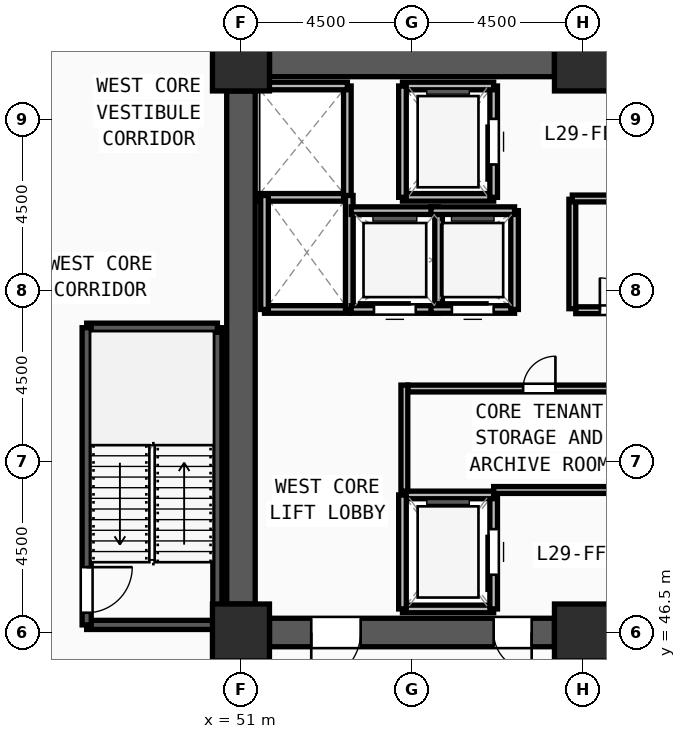
"""IFC4 building model, lengths in metres.
Left out: names, types, materials, properties, quantities, classifications, styles, units other than length and angle.
Written with IfcOpenShell. Run it as: python <this file> out.ifc"""

import sys

from ifc_helpers import new_model, si_unit, direction, frame, frame_2d, origin, origin_2d, place, context, subcontext, project, spatial, rectangle, extrude, source, transform, mapped, element, fill, save


model = new_model("IFC4")
c1 = context("Model", 3, precision=1e-05, world=origin(), true_north=direction((0.0, 1.0)))
c2 = subcontext(c1, "Body", "Model", "MODEL_VIEW")
j1 = project(units=[si_unit("LENGTHUNIT", "METRE"), si_unit("PLANEANGLEUNIT", "RADIAN")], contexts=[c1])
p1 = place(None, origin())
s1 = spatial("IfcSite", under=j1, at=p1, CompositionType="ELEMENT")
p2 = place(p1, origin())
s2 = spatial("IfcBuilding", under=s1, at=p2, CompositionType="ELEMENT")
p3 = place(p2, frame((0.0, 0.0, 113.25)))
s3 = spatial("IfcBuildingStorey", under=s2, at=p3, CompositionType="ELEMENT", Elevation=113.25)
m1 = source(origin(), c2, "Body", "SweptSolid", [
    extrude(rectangle(XDim=1.5, YDim=1.5, at=origin_2d()), origin(), (0.0, 0.0, 1.0), 3.75),
])
for number, where, z_axis, x_axis in (
    (1, (51.0, 46.5, 0.0), (0.0, 0.0, 1.0), (1.0, 0.0, 0.0)),
    (2, (60.0, 46.5, 0.0), (0.0, 0.0, 1.0), (1.0, 0.0, 0.0)),
    (3, (60.0, 61.5, 0.0), (0.0, 0.0, 1.0), (1.0, 0.0, 0.0)),
    (4, (51.0, 61.5, 0.0), (0.0, 0.0, 1.0), (1.0, 0.0, 0.0)),
):
    element("IfcColumn", number, at=place(p3, frame(where, z_axis=z_axis, x_axis=x_axis)), inside=s3, PredefinedType="COLUMN", context=c2, shape_type="MappedRepresentation", body=[
        mapped(m1, transform((0.0, 0.0, 0.0), x_axis=(1.0, 0.0, 0.0), y_axis=(0.0, 1.0, 0.0), z_axis=(0.0, 0.0, 1.0), scale=1.0)),
    ])
p4 = place(p3, frame((51.75, 61.5, 0.0), z_axis=(0.0, 0.0, 1.0), x_axis=(1.0, 0.0, 0.0)))
e5 = element("IfcWall", 5, at=p4, inside=s3, PredefinedType="SHEAR", context=c2, shape_type="SweptSolid", body=[
    extrude(rectangle(XDim=7.5, YDim=0.75, at=frame_2d((3.75, 0.0))), origin(), (0.0, 0.0, 1.0), 3.57),
])
p5 = place(p3, frame((59.25, 46.5, 0.0), z_axis=(0.0, 0.0, 1.0), x_axis=(-1.0, 0.0, 0.0)))
e6 = element("IfcWall", 6, at=p5, inside=s3, PredefinedType="SHEAR", context=c2, shape_type="SweptSolid", body=[
    extrude(rectangle(XDim=7.5, YDim=0.75, at=frame_2d((3.75, 0.0))), origin(), (0.0, 0.0, 1.0), 3.57),
])
m2 = source(origin(), c2, "Body", "SweptSolid", [
    extrude(rectangle(XDim=1.3, YDim=2.2, at=frame_2d((0.65, 1.1))), frame((0.0, 0.385, 0.0), z_axis=(0.0, -1.0, 0.0), x_axis=(1.0, 0.0, 0.0)), (0.0, 0.0, 1.0), 0.77),
])
p6 = place(p5, frame((5.1, 0.0, 0.0)))
e7 = element("IfcOpeningElement", 7, at=p6, cuts=e6, PredefinedType="OPENING", context=c2, shape_type="MappedRepresentation", body=[
    mapped(m2, transform((0.0, 0.0, 0.0), x_axis=(1.0, 0.0, 0.0), y_axis=(0.0, 1.0, 0.0), z_axis=(0.0, 0.0, 1.0), scale=1.0)),
])
m3 = source(origin(), c2, "Body", "SweptSolid", [
    extrude(rectangle(XDim=1.0, YDim=2.2, at=frame_2d((0.5, 1.1))), frame((0.0, 0.385, 0.0), z_axis=(0.0, -1.0, 0.0), x_axis=(1.0, 0.0, 0.0)), (0.0, 0.0, 1.0), 0.77),
])
p7 = place(p5, frame((0.6, 0.0, 0.0)))
e8 = element("IfcOpeningElement", 8, at=p7, cuts=e6, PredefinedType="OPENING", context=c2, shape_type="MappedRepresentation", body=[
    mapped(m3, transform((0.0, 0.0, 0.0), x_axis=(1.0, 0.0, 0.0), y_axis=(0.0, 1.0, 0.0), z_axis=(0.0, 0.0, 1.0), scale=1.0)),
])
p8 = place(p3, frame((51.0, 47.25, 0.0), z_axis=(0.0, 0.0, 1.0), x_axis=(0.0, 1.0, 0.0)))
e9 = element("IfcWall", 9, at=p8, inside=s3, PredefinedType="SHEAR", context=c2, shape_type="SweptSolid", body=[
    extrude(rectangle(XDim=13.5, YDim=0.75, at=frame_2d((6.75, 0.0))), origin(), (0.0, 0.0, 1.0), 3.57),
])
p9 = place(p3, frame((46.94, 46.7, 0.0), z_axis=(0.0, 0.0, 1.0), x_axis=(1.0, 0.0, 0.0)))
e10 = element("IfcWall", 10, at=p9, inside=s3, PredefinedType="SOLIDWALL", context=c2, shape_type="SweptSolid", body=[
    extrude(rectangle(XDim=3.44, YDim=0.24, at=frame_2d((1.72, 0.0))), origin(), (0.0, 0.0, 1.0), 3.57),
])
p10 = place(p3, frame((50.38, 46.7, 0.0), z_axis=(0.0, 0.0, 1.0), x_axis=(0.0, 1.0, 0.0)))
e11 = element("IfcWall", 11, at=p10, inside=s3, PredefinedType="SOLIDWALL", context=c2, shape_type="SweptSolid", body=[
    extrude(rectangle(XDim=7.82, YDim=0.24, at=frame_2d((3.91, 0.0))), origin(), (0.0, 0.0, 1.0), 3.57),
])
p11 = place(p3, frame((50.38, 54.52, 0.0), z_axis=(0.0, 0.0, 1.0), x_axis=(-1.0, 0.0, 0.0)))
e12 = element("IfcWall", 12, at=p11, inside=s3, PredefinedType="SOLIDWALL", context=c2, shape_type="SweptSolid", body=[
    extrude(rectangle(XDim=3.44, YDim=0.24, at=frame_2d((1.72, 0.0))), origin(), (0.0, 0.0, 1.0), 3.57),
])
p12 = place(p3, frame((46.94, 54.52, 0.0), z_axis=(0.0, 0.0, 1.0), x_axis=(0.0, -1.0, 0.0)))
e13 = element("IfcWall", 13, at=p12, inside=s3, PredefinedType="SOLIDWALL", context=c2, shape_type="SweptSolid", body=[
    extrude(rectangle(XDim=7.82, YDim=0.24, at=frame_2d((3.91, 0.0))), origin(), (0.0, 0.0, 1.0), 3.57),
])
m4 = source(origin(), c2, "Body", "SweptSolid", [
    extrude(rectangle(XDim=1.2, YDim=2.2, at=frame_2d((0.6, 1.1))), frame((0.0, 0.13, 0.0), z_axis=(0.0, -1.0, 0.0), x_axis=(1.0, 0.0, 0.0)), (0.0, 0.0, 1.0), 0.26),
])
p13 = place(p12, frame((6.3, 0.0, 0.0)))
e14 = element("IfcOpeningElement", 14, at=p13, cuts=e13, PredefinedType="OPENING", context=c2, shape_type="MappedRepresentation", body=[
    mapped(m4, transform((0.0, 0.0, 0.0), x_axis=(1.0, 0.0, 0.0), y_axis=(0.0, 1.0, 0.0), z_axis=(0.0, 0.0, 1.0), scale=1.0)),
])
p14 = place(p3, frame((55.25, 47.12, 0.0), z_axis=(0.0, 0.0, 1.0), x_axis=(1.0, 0.0, 0.0)))
e15 = element("IfcWall", 15, at=p14, inside=s3, PredefinedType="SOLIDWALL", context=c2, shape_type="SweptSolid", body=[
    extrude(rectangle(XDim=2.4, YDim=0.2, at=frame_2d((1.2, 0.0))), origin(), (0.0, 0.0, 1.0), 3.57),
])
p15 = place(p3, frame((57.65, 47.12, 0.0), z_axis=(0.0, 0.0, 1.0), x_axis=(0.0, 1.0, 0.0)))
e16 = element("IfcWall", 16, at=p15, inside=s3, PredefinedType="SOLIDWALL", context=c2, shape_type="SweptSolid", body=[
    extrude(rectangle(XDim=3.0, YDim=0.2, at=frame_2d((1.5, 0.0))), origin(), (0.0, 0.0, 1.0), 3.57),
])
m5 = source(origin(), c2, "Body", "SweptSolid", [
    extrude(rectangle(XDim=1.2, YDim=2.3, at=frame_2d((0.6, 1.15))), frame((0.0, 0.11, 0.0), z_axis=(0.0, -1.0, 0.0), x_axis=(1.0, 0.0, 0.0)), (0.0, 0.0, 1.0), 0.22),
])
p16 = place(p15, frame((0.9, 0.0, 0.0)))
e17 = element("IfcOpeningElement", 17, at=p16, cuts=e16, PredefinedType="OPENING", context=c2, shape_type="MappedRepresentation", body=[
    mapped(m5, transform((0.0, 0.0, 0.0), x_axis=(1.0, 0.0, 0.0), y_axis=(0.0, 1.0, 0.0), z_axis=(0.0, 0.0, 1.0), scale=1.0)),
])
p17 = place(p3, frame((57.65, 50.12, 0.0), z_axis=(0.0, 0.0, 1.0), x_axis=(-1.0, 0.0, 0.0)))
e18 = element("IfcWall", 18, at=p17, inside=s3, PredefinedType="SOLIDWALL", context=c2, shape_type="SweptSolid", body=[
    extrude(rectangle(XDim=2.4, YDim=0.2, at=frame_2d((1.2, 0.0))), origin(), (0.0, 0.0, 1.0), 3.57),
])
p18 = place(p3, frame((55.25, 50.12, 0.0), z_axis=(0.0, 0.0, 1.0), x_axis=(0.0, -1.0, 0.0)))
e19 = element("IfcWall", 19, at=p18, inside=s3, PredefinedType="SOLIDWALL", context=c2, shape_type="SweptSolid", body=[
    extrude(rectangle(XDim=3.0, YDim=0.2, at=frame_2d((1.5, 0.0))), origin(), (0.0, 0.0, 1.0), 3.57),
])
p19 = place(p3, frame((55.25, 57.95, 0.0), z_axis=(0.0, 0.0, 1.0), x_axis=(1.0, 0.0, 0.0)))
e20 = element("IfcWall", 20, at=p19, inside=s3, PredefinedType="SOLIDWALL", context=c2, shape_type="SweptSolid", body=[
    extrude(rectangle(XDim=2.4, YDim=0.2, at=frame_2d((1.2, 0.0))), origin(), (0.0, 0.0, 1.0), 3.57),
])
p20 = place(p3, frame((57.65, 57.95, 0.0), z_axis=(0.0, 0.0, 1.0), x_axis=(0.0, 1.0, 0.0)))
e21 = element("IfcWall", 21, at=p20, inside=s3, PredefinedType="SOLIDWALL", context=c2, shape_type="SweptSolid", body=[
    extrude(rectangle(XDim=2.93, YDim=0.2, at=frame_2d((1.465, 0.0))), origin(), (0.0, 0.0, 1.0), 3.57),
])
p21 = place(p20, frame((0.865, 0.0, 0.0)))
e22 = element("IfcOpeningElement", 22, at=p21, cuts=e21, PredefinedType="OPENING", context=c2, shape_type="MappedRepresentation", body=[
    mapped(m5, transform((0.0, 0.0, 0.0), x_axis=(1.0, 0.0, 0.0), y_axis=(0.0, 1.0, 0.0), z_axis=(0.0, 0.0, 1.0), scale=1.0)),
])
p22 = place(p3, frame((57.65, 60.88, 0.0), z_axis=(0.0, 0.0, 1.0), x_axis=(-1.0, 0.0, 0.0)))
e23 = element("IfcWall", 23, at=p22, inside=s3, PredefinedType="SOLIDWALL", context=c2, shape_type="SweptSolid", body=[
    extrude(rectangle(XDim=2.4, YDim=0.2, at=frame_2d((1.2, 0.0))), origin(), (0.0, 0.0, 1.0), 3.57),
])
p23 = place(p3, frame((55.25, 60.88, 0.0), z_axis=(0.0, 0.0, 1.0), x_axis=(0.0, -1.0, 0.0)))
e24 = element("IfcWall", 24, at=p23, inside=s3, PredefinedType="SOLIDWALL", context=c2, shape_type="SweptSolid", body=[
    extrude(rectangle(XDim=2.93, YDim=0.2, at=frame_2d((1.465, 0.0))), origin(), (0.0, 0.0, 1.0), 3.57),
])
p24 = place(p3, frame((51.4, 57.95, 0.0), z_axis=(0.0, 0.0, 1.0), x_axis=(1.0, 0.0, 0.0)))
e25 = element("IfcWall", 25, at=p24, inside=s3, PredefinedType="SOLIDWALL", context=c2, shape_type="SweptSolid", body=[
    extrude(rectangle(XDim=2.4, YDim=0.2, at=frame_2d((1.2, 0.0))), origin(), (0.0, 0.0, 1.0), 3.57),
])
p25 = place(p3, frame((53.8, 57.95, 0.0), z_axis=(0.0, 0.0, 1.0), x_axis=(0.0, 1.0, 0.0)))
e26 = element("IfcWall", 26, at=p25, inside=s3, PredefinedType="SOLIDWALL", context=c2, shape_type="SweptSolid", body=[
    extrude(rectangle(XDim=2.93, YDim=0.2, at=frame_2d((1.465, 0.0))), origin(), (0.0, 0.0, 1.0), 3.57),
])
p26 = place(p3, frame((53.8, 60.88, 0.0), z_axis=(0.0, 0.0, 1.0), x_axis=(-1.0, 0.0, 0.0)))
e27 = element("IfcWall", 27, at=p26, inside=s3, PredefinedType="SOLIDWALL", context=c2, shape_type="SweptSolid", body=[
    extrude(rectangle(XDim=2.4, YDim=0.2, at=frame_2d((1.2, 0.0))), origin(), (0.0, 0.0, 1.0), 3.57),
])
p27 = place(p3, frame((51.62, 55.0, 0.0), z_axis=(0.0, 0.0, 1.0), x_axis=(1.0, 0.0, 0.0)))
e28 = element("IfcWall", 28, at=p27, inside=s3, PredefinedType="SOLIDWALL", context=c2, shape_type="SweptSolid", body=[
    extrude(rectangle(XDim=2.23, YDim=0.2, at=frame_2d((1.115, 0.0))), origin(), (0.0, 0.0, 1.0), 3.57),
])
for number, where, z_axis, x_axis in (
    (29, (53.85, 55.0, 0.0), (0.0, 0.0, 1.0), (0.0, 1.0, 0.0)),
    (30, (51.62, 58.0, 0.0), (0.0, 0.0, 1.0), (0.0, -1.0, 0.0)),
):
    element("IfcWall", number, at=place(p3, frame(where, z_axis=z_axis, x_axis=x_axis)), inside=s3, PredefinedType="SOLIDWALL", context=c2, shape_type="SweptSolid", body=[
        extrude(rectangle(XDim=3.0, YDim=0.2, at=frame_2d((1.5, 0.0))), origin(), (0.0, 0.0, 1.0), 3.57),
    ])
p28 = place(p3, frame((53.9, 55.0, 0.0), z_axis=(0.0, 0.0, 1.0), x_axis=(1.0, 0.0, 0.0)))
e31 = element("IfcWall", 31, at=p28, inside=s3, PredefinedType="SOLIDWALL", context=c2, shape_type="SweptSolid", body=[
    extrude(rectangle(XDim=2.3, YDim=0.2, at=frame_2d((1.15, 0.0))), origin(), (0.0, 0.0, 1.0), 3.57),
])
m6 = source(origin(), c2, "Body", "SweptSolid", [
    extrude(rectangle(XDim=1.1, YDim=2.2, at=frame_2d((0.55, 1.1))), frame((0.0, 0.11, 0.0), z_axis=(0.0, -1.0, 0.0), x_axis=(1.0, 0.0, 0.0)), (0.0, 0.0, 1.0), 0.22),
])
p29 = place(p28, frame((0.6, 0.0, 0.0)))
e32 = element("IfcOpeningElement", 32, at=p29, cuts=e31, PredefinedType="OPENING", context=c2, shape_type="MappedRepresentation", body=[
    mapped(m6, transform((0.0, 0.0, 0.0), x_axis=(1.0, 0.0, 0.0), y_axis=(0.0, 1.0, 0.0), z_axis=(0.0, 0.0, 1.0), scale=1.0)),
])
p30 = place(p3, frame((56.2, 55.0, 0.0), z_axis=(0.0, 0.0, 1.0), x_axis=(0.0, 1.0, 0.0)))
e33 = element("IfcWall", 33, at=p30, inside=s3, PredefinedType="SOLIDWALL", context=c2, shape_type="SweptSolid", body=[
    extrude(rectangle(XDim=2.6, YDim=0.2, at=frame_2d((1.3, 0.0))), origin(), (0.0, 0.0, 1.0), 3.57),
])
p31 = place(p3, frame((56.2, 57.6, 0.0), z_axis=(0.0, 0.0, 1.0), x_axis=(-1.0, 0.0, 0.0)))
e34 = element("IfcWall", 34, at=p31, inside=s3, PredefinedType="SOLIDWALL", context=c2, shape_type="SweptSolid", body=[
    extrude(rectangle(XDim=2.3, YDim=0.2, at=frame_2d((1.15, 0.0))), origin(), (0.0, 0.0, 1.0), 3.57),
])
p32 = place(p3, frame((56.0, 55.0, 0.0), z_axis=(0.0, 0.0, 1.0), x_axis=(1.0, 0.0, 0.0)))
e35 = element("IfcWall", 35, at=p32, inside=s3, PredefinedType="SOLIDWALL", context=c2, shape_type="SweptSolid", body=[
    extrude(rectangle(XDim=2.2, YDim=0.2, at=frame_2d((1.1, 0.0))), origin(), (0.0, 0.0, 1.0), 3.57),
])
p33 = place(p32, frame((0.55, 0.0, 0.0)))
e36 = element("IfcOpeningElement", 36, at=p33, cuts=e35, PredefinedType="OPENING", context=c2, shape_type="MappedRepresentation", body=[
    mapped(m6, transform((0.0, 0.0, 0.0), x_axis=(1.0, 0.0, 0.0), y_axis=(0.0, 1.0, 0.0), z_axis=(0.0, 0.0, 1.0), scale=1.0)),
])
p34 = place(p3, frame((58.2, 55.0, 0.0), z_axis=(0.0, 0.0, 1.0), x_axis=(0.0, 1.0, 0.0)))
e37 = element("IfcWall", 37, at=p34, inside=s3, PredefinedType="SOLIDWALL", context=c2, shape_type="SweptSolid", body=[
    extrude(rectangle(XDim=2.6, YDim=0.2, at=frame_2d((1.3, 0.0))), origin(), (0.0, 0.0, 1.0), 3.57),
])
p35 = place(p3, frame((58.2, 57.6, 0.0), z_axis=(0.0, 0.0, 1.0), x_axis=(-1.0, 0.0, 0.0)))
e38 = element("IfcWall", 38, at=p35, inside=s3, PredefinedType="SOLIDWALL", context=c2, shape_type="SweptSolid", body=[
    extrude(rectangle(XDim=2.2, YDim=0.2, at=frame_2d((1.1, 0.0))), origin(), (0.0, 0.0, 1.0), 3.57),
])
p36 = place(p3, frame((55.39, 52.92, 0.0), z_axis=(0.0, 0.0, 1.0), x_axis=(1.0, 0.0, 0.0)))
e39 = element("IfcWall", 39, at=p36, inside=s3, PredefinedType="PARTITIONING", context=c2, shape_type="SweptSolid", body=[
    extrude(rectangle(XDim=6.91, YDim=0.18, at=frame_2d((3.455, 0.0))), origin(), (0.0, 0.0, 1.0), 3.57),
])
m7 = source(origin(), c2, "Body", "SweptSolid", [
    extrude(rectangle(XDim=0.85, YDim=2.1, at=frame_2d((0.425, 1.05))), frame((0.0, 0.1, 0.0), z_axis=(0.0, -1.0, 0.0), x_axis=(1.0, 0.0, 0.0)), (0.0, 0.0, 1.0), 0.2),
])
p37 = place(p36, frame((3.035, 0.0, 0.0)))
e40 = element("IfcOpeningElement", 40, at=p37, cuts=e39, PredefinedType="OPENING", context=c2, shape_type="MappedRepresentation", body=[
    mapped(m7, transform((0.0, 0.0, 0.0), x_axis=(1.0, 0.0, 0.0), y_axis=(0.0, 1.0, 0.0), z_axis=(0.0, 0.0, 1.0), scale=1.0)),
])
p38 = place(p3, frame((59.81, 54.98, 0.0), z_axis=(0.0, 0.0, 1.0), x_axis=(1.0, 0.0, 0.0)))
e41 = element("IfcWall", 41, at=p38, inside=s3, PredefinedType="PARTITIONING", context=c2, shape_type="SweptSolid", body=[
    extrude(rectangle(XDim=2.11, YDim=0.18, at=frame_2d((1.055, 0.0))), origin(), (0.0, 0.0, 1.0), 3.57),
])
p39 = place(p38, frame((0.635, 0.0, 0.0)))
e42 = element("IfcOpeningElement", 42, at=p39, cuts=e41, PredefinedType="OPENING", context=c2, shape_type="MappedRepresentation", body=[
    mapped(m7, transform((0.0, 0.0, 0.0), x_axis=(1.0, 0.0, 0.0), y_axis=(0.0, 1.0, 0.0), z_axis=(0.0, 0.0, 1.0), scale=1.0)),
])
p40 = place(p3, frame((59.72, 55.02, 0.0), z_axis=(0.0, 0.0, 1.0), x_axis=(0.0, 1.0, 0.0)))
e43 = element("IfcWall", 43, at=p40, inside=s3, PredefinedType="PARTITIONING", context=c2, shape_type="SweptSolid", body=[
    extrude(rectangle(XDim=2.88, YDim=0.18, at=frame_2d((1.44, 0.0))), origin(), (0.0, 0.0, 1.0), 3.57),
])
p41 = place(p3, frame((59.72, 57.92, 0.0), z_axis=(0.0, 0.0, 1.0), x_axis=(1.0, 0.0, 0.0)))
e44 = element("IfcWall", 44, at=p41, inside=s3, PredefinedType="PARTITIONING", context=c2, shape_type="SweptSolid", body=[
    extrude(rectangle(XDim=2.29, YDim=0.18, at=frame_2d((1.145, 0.0))), origin(), (0.0, 0.0, 1.0), 3.57),
])
p42 = place(p3, frame((55.3, 50.22, 0.0), z_axis=(0.0, 0.0, 1.0), x_axis=(0.0, 1.0, 0.0)))
e45 = element("IfcWall", 45, at=p42, inside=s3, PredefinedType="PARTITIONING", context=c2, shape_type="SweptSolid", body=[
    extrude(rectangle(XDim=2.79, YDim=0.18, at=frame_2d((1.395, 0.0))), origin(), (0.0, 0.0, 1.0), 3.57),
])
p43 = place(p3, frame((57.65, 50.25, 0.0), z_axis=(0.0, 0.0, 1.0), x_axis=(1.0, 0.0, 0.0)))
e46 = element("IfcWall", 46, at=p43, inside=s3, PredefinedType="PARTITIONING", context=c2, shape_type="SweptSolid", body=[
    extrude(rectangle(XDim=4.65, YDim=0.18, at=frame_2d((2.325, 0.0))), origin(), (0.0, 0.0, 1.0), 3.57),
])
m8 = source(origin(), c2, "Body", "SweptSolid", [
    extrude(rectangle(XDim=1.3, YDim=2.2, at=frame_2d((0.65, 1.1))), frame((0.0, 0.025, 0.0), z_axis=(0.0, -1.0, 0.0), x_axis=(1.0, 0.0, 0.0)), (0.0, 0.0, 1.0), 0.05),
])
p44 = place(p6, origin())
e47 = element("IfcDoor", 47, at=p44, inside=s3, OperationType="SINGLE_SWING_RIGHT", PredefinedType="DOOR", context=c2, shape_type="MappedRepresentation", body=[
    mapped(m8, transform((0.0, 0.0, 0.0), x_axis=(1.0, 0.0, 0.0), y_axis=(0.0, 1.0, 0.0), z_axis=(0.0, 0.0, 1.0), scale=1.0)),
])
fill(e7, e47)
m9 = source(origin(), c2, "Body", "SweptSolid", [
    extrude(rectangle(XDim=1.0, YDim=2.2, at=frame_2d((0.5, 1.1))), frame((0.0, 0.025, 0.0), z_axis=(0.0, -1.0, 0.0), x_axis=(1.0, 0.0, 0.0)), (0.0, 0.0, 1.0), 0.05),
])
p45 = place(p7, origin())
e48 = element("IfcDoor", 48, at=p45, inside=s3, OperationType="SINGLE_SWING_LEFT", PredefinedType="DOOR", context=c2, shape_type="MappedRepresentation", body=[
    mapped(m9, transform((0.0, 0.0, 0.0), x_axis=(1.0, 0.0, 0.0), y_axis=(0.0, 1.0, 0.0), z_axis=(0.0, 0.0, 1.0), scale=1.0)),
])
fill(e8, e48)
m10 = source(origin(), c2, "Body", "SweptSolid", [
    extrude(rectangle(XDim=1.2, YDim=2.2, at=frame_2d((0.6, 1.1))), frame((0.0, 0.025, 0.0), z_axis=(0.0, -1.0, 0.0), x_axis=(1.0, 0.0, 0.0)), (0.0, 0.0, 1.0), 0.05),
])
p46 = place(p13, origin())
e49 = element("IfcDoor", 49, at=p46, inside=s3, OperationType="SINGLE_SWING_LEFT", PredefinedType="DOOR", context=c2, shape_type="MappedRepresentation", body=[
    mapped(m10, transform((0.0, 0.0, 0.0), x_axis=(1.0, 0.0, 0.0), y_axis=(0.0, 1.0, 0.0), z_axis=(0.0, 0.0, 1.0), scale=1.0)),
])
fill(e14, e49)
m11 = source(origin(), c2, "Body", "SweptSolid", [
    extrude(rectangle(XDim=1.2, YDim=2.3, at=frame_2d((0.6, 1.15))), frame((0.0, 0.025, 0.0), z_axis=(0.0, -1.0, 0.0), x_axis=(1.0, 0.0, 0.0)), (0.0, 0.0, 1.0), 0.05),
])
p47 = place(p16, origin())
e50 = element("IfcDoor", 50, at=p47, inside=s3, OperationType="SLIDING_TO_LEFT", PredefinedType="DOOR", context=c2, shape_type="MappedRepresentation", body=[
    mapped(m11, transform((0.0, 0.0, 0.0), x_axis=(1.0, 0.0, 0.0), y_axis=(0.0, 1.0, 0.0), z_axis=(0.0, 0.0, 1.0), scale=1.0)),
])
fill(e17, e50)
p48 = place(p21, origin())
e51 = element("IfcDoor", 51, at=p48, inside=s3, OperationType="SLIDING_TO_LEFT", PredefinedType="DOOR", context=c2, shape_type="MappedRepresentation", body=[
    mapped(m11, transform((0.0, 0.0, 0.0), x_axis=(1.0, 0.0, 0.0), y_axis=(0.0, 1.0, 0.0), z_axis=(0.0, 0.0, 1.0), scale=1.0)),
])
fill(e22, e51)
m12 = source(origin(), c2, "Body", "SweptSolid", [
    extrude(rectangle(XDim=1.1, YDim=2.2, at=frame_2d((0.55, 1.1))), frame((0.0, 0.025, 0.0), z_axis=(0.0, -1.0, 0.0), x_axis=(1.0, 0.0, 0.0)), (0.0, 0.0, 1.0), 0.05),
])
p49 = place(p29, origin())
e52 = element("IfcDoor", 52, at=p49, inside=s3, OperationType="SLIDING_TO_LEFT", PredefinedType="DOOR", context=c2, shape_type="MappedRepresentation", body=[
    mapped(m12, transform((0.0, 0.0, 0.0), x_axis=(1.0, 0.0, 0.0), y_axis=(0.0, 1.0, 0.0), z_axis=(0.0, 0.0, 1.0), scale=1.0)),
])
fill(e32, e52)
p50 = place(p33, origin())
e53 = element("IfcDoor", 53, at=p50, inside=s3, OperationType="SLIDING_TO_LEFT", PredefinedType="DOOR", context=c2, shape_type="MappedRepresentation", body=[
    mapped(m12, transform((0.0, 0.0, 0.0), x_axis=(1.0, 0.0, 0.0), y_axis=(0.0, 1.0, 0.0), z_axis=(0.0, 0.0, 1.0), scale=1.0)),
])
fill(e36, e53)
m13 = source(origin(), c2, "Body", "SweptSolid", [
    extrude(rectangle(XDim=0.85, YDim=2.1, at=frame_2d((0.425, 1.05))), frame((0.0, 0.025, 0.0), z_axis=(0.0, -1.0, 0.0), x_axis=(1.0, 0.0, 0.0)), (0.0, 0.0, 1.0), 0.05),
])
p51 = place(p37, origin())
e54 = element("IfcDoor", 54, at=p51, inside=s3, OperationType="SINGLE_SWING_RIGHT", PredefinedType="DOOR", context=c2, shape_type="MappedRepresentation", body=[
    mapped(m13, transform((0.0, 0.0, 0.0), x_axis=(1.0, 0.0, 0.0), y_axis=(0.0, 1.0, 0.0), z_axis=(0.0, 0.0, 1.0), scale=1.0)),
])
fill(e40, e54)
p52 = place(p39, origin())
e55 = element("IfcDoor", 55, at=p52, inside=s3, OperationType="SINGLE_SWING_LEFT", PredefinedType="DOOR", context=c2, shape_type="MappedRepresentation", body=[
    mapped(m13, transform((0.0, 0.0, 0.0), x_axis=(1.0, 0.0, 0.0), y_axis=(0.0, 1.0, 0.0), z_axis=(0.0, 0.0, 1.0), scale=1.0)),
])
fill(e42, e55)
save(model, sys.argv[1])
